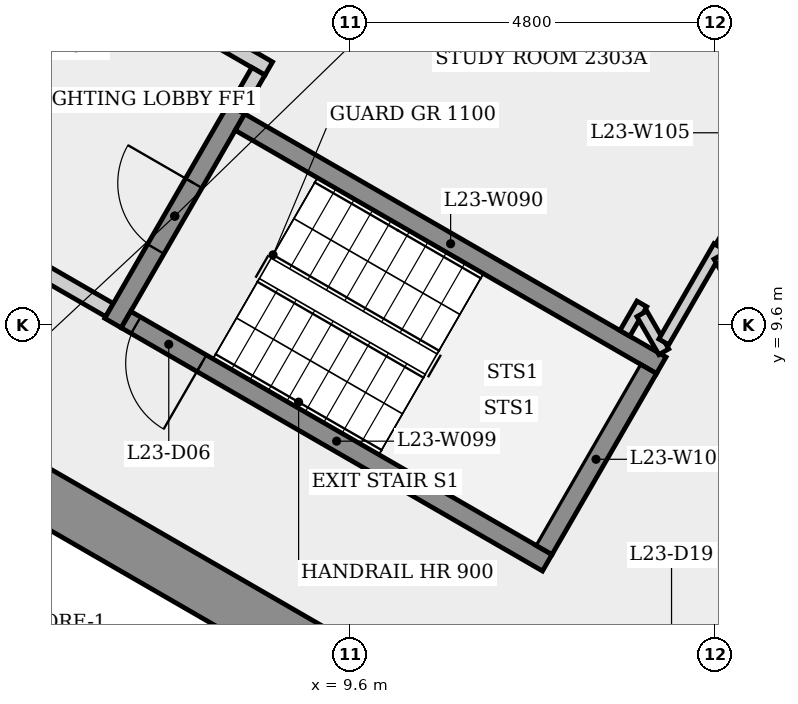
"""IFC4 building model, lengths in metres.
Left out: names, types, materials, properties, quantities, classifications, styles, units other than length and angle.
Written with IfcOpenShell. Run it as: python <this file> out.ifc"""

import sys

from ifc_helpers import new_model, si_unit, direction, frame, frame_2d, origin, origin_2d, place, context, subcontext, project, spatial, rectangle, extrude, element, fill, save


model = new_model("IFC4")
c1 = context("Model", 3, precision=1e-05, world=origin(), true_north=direction((0.0, 1.0)))
c2 = subcontext(c1, "Body", "Model", "MODEL_VIEW")
j1 = project(units=[si_unit("LENGTHUNIT", "METRE"), si_unit("PLANEANGLEUNIT", "RADIAN")], contexts=[c1])
p1 = place(None, origin())
s1 = spatial("IfcSite", under=j1, at=p1, CompositionType="ELEMENT")
p2 = place(p1, origin())
s2 = spatial("IfcBuilding", under=s1, at=p2, CompositionType="ELEMENT")
p3 = place(p2, frame((0.0, 0.0, 89.9)))
s3 = spatial("IfcBuildingStorey", under=s2, at=p3, CompositionType="ELEMENT", Elevation=89.9)
p4 = place(p3, frame((9.325, 5.182, 0.0), z_axis=(0.0, 0.0, 1.0), x_axis=(-0.866023993627, 0.500002442456, 0.0)))
e1 = element("IfcWall", 1, at=p4, inside=s3, PredefinedType="SHEAR", context=c2, shape_type="SweptSolid", body=[
    extrude(rectangle(XDim=10.97, YDim=0.7, at=frame_2d((5.485, 0.0))), origin(), (0.0, 0.0, 1.0), 3.4),
])
p5 = place(p4, frame((5.451, 0.0, 0.0)))
e2 = element("IfcOpeningElement", 2, at=p5, cuts=e1, PredefinedType="OPENING", context=c2, shape_type="SweptSolid", body=[
    extrude(rectangle(XDim=0.9, YDim=2.1, at=frame_2d((0.45, 1.05))), frame((0.0, 0.36, 0.0), z_axis=(0.0, -1.0, 0.0), x_axis=(1.0, 0.0, 0.0)), (0.0, 0.0, 1.0), 0.72),
])
p6 = place(p3, frame((14.659, 13.865, 0.0), z_axis=(0.0, 0.0, 1.0), x_axis=(0.5, 0.866025403784, 0.0)))
e3 = element("IfcColumn", 3, at=p6, inside=s3, PredefinedType="COLUMN", context=c2, shape_type="SweptSolid", body=[
    extrude(rectangle(XDim=1.05, YDim=1.05, at=origin_2d()), origin(), (0.0, 0.0, 1.0), 3.4),
])
p7 = place(p3, frame((4.459, 15.323, 0.0), z_axis=(0.0, 0.0, 1.0), x_axis=(0.866016039709, -0.500016218704, 0.0)))
e4 = element("IfcWall", 4, at=p7, inside=s3, PredefinedType="PARTITIONING", context=c2, shape_type="SweptSolid", body=[
    extrude(rectangle(XDim=4.7, YDim=0.2, at=frame_2d((2.35, 0.0))), origin(), (0.0, 0.0, 1.0), 3.05),
])
p8 = place(p3, frame((6.435, 9.795, 0.0), z_axis=(0.0, 0.0, 1.0), x_axis=(-0.866012907634, 0.500021643343, 0.0)))
e5 = element("IfcWall", 5, at=p8, inside=s3, PredefinedType="PARTITIONING", context=c2, shape_type="SweptSolid", body=[
    extrude(rectangle(XDim=4.45, YDim=0.2, at=frame_2d((2.225, 0.0))), origin(), (0.0, 0.0, 1.0), 3.05),
])
p9 = place(p8, frame((1.675, 0.0, 0.0)))
e6 = element("IfcOpeningElement", 6, at=p9, cuts=e5, PredefinedType="OPENING", context=c2, shape_type="SweptSolid", body=[
    extrude(rectangle(XDim=1.1, YDim=2.1, at=frame_2d((0.55, 1.05))), frame((0.0, 0.11, 0.0), z_axis=(0.0, -1.0, 0.0), x_axis=(1.0, 0.0, 0.0)), (0.0, 0.0, 1.0), 0.22),
])
p10 = place(p3, frame((6.48, 9.624, 0.0), z_axis=(0.0, 0.0, 1.0), x_axis=(0.500017246033, 0.866015446554, 0.0)))
e7 = element("IfcWall", 7, at=p10, inside=s3, PredefinedType="SHEAR", context=c2, shape_type="SweptSolid", body=[
    extrude(rectangle(XDim=3.25, YDim=0.25, at=frame_2d((1.625, 0.0))), origin(), (0.0, 0.0, 1.0), 3.05),
])
p11 = place(p10, frame((1.125, 0.0, 0.0)))
e8 = element("IfcOpeningElement", 8, at=p11, cuts=e7, PredefinedType="OPENING", context=c2, shape_type="SweptSolid", body=[
    extrude(rectangle(XDim=1.0, YDim=2.1, at=frame_2d((0.5, 1.05))), frame((0.0, 0.135, 0.0), z_axis=(0.0, -1.0, 0.0), x_axis=(1.0, 0.0, 0.0)), (0.0, 0.0, 1.0), 0.27),
])
p12 = place(p3, frame((8.151, 12.268, 0.0), z_axis=(0.0, 0.0, 1.0), x_axis=(0.866025499775, -0.499999833739, 0.0)))
e9 = element("IfcWall", 9, at=p12, inside=s3, PredefinedType="SHEAR", context=c2, shape_type="SweptSolid", body=[
    extrude(rectangle(XDim=6.4, YDim=0.25, at=frame_2d((3.2, 0.0))), origin(), (0.0, 0.0, 1.0), 3.05),
])
p13 = place(p3, frame((8.393, 12.937, 0.0), z_axis=(0.0, 0.0, 1.0), x_axis=(-0.500065409566, -0.86598763626, 0.0)))
e10 = element("IfcWall", 10, at=p13, inside=s3, PredefinedType="PARTITIONING", context=c2, shape_type="SweptSolid", body=[
    extrude(rectangle(XDim=0.575, YDim=0.2, at=frame_2d((0.288, 0.0))), origin(), (0.0, 0.0, 1.0), 3.05),
])
p14 = place(p3, frame((12.194, 6.47, 0.0), z_axis=(0.0, 0.0, 1.0), x_axis=(-0.866025499775, 0.499999833739, 0.0)))
e11 = element("IfcWall", 11, at=p14, inside=s3, PredefinedType="SHEAR", context=c2, shape_type="SweptSolid", body=[
    extrude(rectangle(XDim=6.4, YDim=0.25, at=frame_2d((3.2, 0.0))), origin(), (0.0, 0.0, 1.0), 3.05),
])
p15 = place(p14, frame((5.25, 0.0, 0.0)))
e12 = element("IfcOpeningElement", 12, at=p15, cuts=e11, PredefinedType="OPENING", context=c2, shape_type="SweptSolid", body=[
    extrude(rectangle(XDim=1.0, YDim=2.1, at=frame_2d((0.5, 1.05))), frame((0.0, 0.135, 0.0), z_axis=(0.0, -1.0, 0.0), x_axis=(1.0, 0.0, 0.0)), (0.0, 0.0, 1.0), 0.27),
])
p16 = place(p3, frame((13.215, 9.489, 0.0), z_axis=(0.0, 0.0, 1.0), x_axis=(0.500132045864, 0.865949153646, 0.0)))
e13 = element("IfcWall", 13, at=p16, inside=s3, PredefinedType="PARTITIONING", context=c2, shape_type="SweptSolid", body=[
    extrude(rectangle(XDim=0.447, YDim=0.15, at=frame_2d((0.224, 0.0))), origin(), (0.0, 0.0, 1.0), 3.05),
])
p17 = place(p3, frame((13.438, 9.746, 0.0), z_axis=(0.0, 0.0, 1.0), x_axis=(0.499868889286, -0.866101087359, 0.0)))
e14 = element("IfcWall", 14, at=p17, inside=s3, PredefinedType="PARTITIONING", context=c2, shape_type="SweptSolid", body=[
    extrude(rectangle(XDim=0.577, YDim=0.15, at=frame_2d((0.289, 0.0))), origin(), (0.0, 0.0, 1.0), 3.05),
])
p18 = place(p3, frame((13.523, 9.022, 0.0), z_axis=(0.0, 0.0, 1.0), x_axis=(-0.500034990121, -0.866005201286, 0.0)))
e15 = element("IfcWall", 15, at=p18, inside=s3, PredefinedType="SHEAR", context=c2, shape_type="SweptSolid", body=[
    extrude(rectangle(XDim=2.75, YDim=0.25, at=frame_2d((1.375, 0.0))), origin(), (0.0, 0.0, 1.0), 3.05),
])
p19 = place(p3, frame((13.727, 9.376, 0.0), z_axis=(0.0, 0.0, 1.0), x_axis=(0.499994385119, 0.866028645513, 0.0)))
e16 = element("IfcWall", 16, at=p19, inside=s3, PredefinedType="PARTITIONING", context=c2, shape_type="SweptSolid", body=[
    extrude(rectangle(XDim=1.451, YDim=0.15, at=frame_2d((0.725, 0.0))), origin(), (0.0, 0.0, 1.0), 3.05),
])
p20 = place(p3, frame((14.452, 10.632, 0.0), z_axis=(0.0, 0.0, 1.0), x_axis=(0.499993736042, 0.866029020252, 0.0)))
e17 = element("IfcWall", 17, at=p20, inside=s3, PredefinedType="PARTITIONING", context=c2, shape_type="SweptSolid", body=[
    extrude(rectangle(XDim=3.454, YDim=0.1, at=frame_2d((1.727, 0.0))), origin(), (0.0, 0.0, 1.0), 3.05),
])
p21 = place(p20, frame((1.016, 0.0, 0.0)))
e18 = element("IfcOpeningElement", 18, at=p21, cuts=e17, PredefinedType="OPENING", context=c2, shape_type="SweptSolid", body=[
    extrude(rectangle(XDim=0.9, YDim=2.1, at=frame_2d((0.45, 1.05))), frame((0.0, 0.06, 0.0), z_axis=(0.0, -1.0, 0.0), x_axis=(1.0, 0.0, 0.0)), (0.0, 0.0, 1.0), 0.12),
])
p22 = place(p3, frame((14.452, 10.502, 0.0), z_axis=(0.0, 0.0, 1.0), x_axis=(0.500025088952, -0.866010918186, 0.0)))
e19 = element("IfcWall", 19, at=p22, inside=s3, PredefinedType="PARTITIONING", context=c2, shape_type="SweptSolid", body=[
    extrude(rectangle(XDim=5.703, YDim=0.15, at=frame_2d((2.852, 0.0))), origin(), (0.0, 0.0, 1.0), 3.05),
])
p23 = place(p22, frame((2.297, 0.0, 0.0)))
e20 = element("IfcOpeningElement", 20, at=p23, cuts=e19, PredefinedType="OPENING", context=c2, shape_type="SweptSolid", body=[
    extrude(rectangle(XDim=1.0, YDim=2.1, at=frame_2d((0.5, 1.05))), frame((0.0, 0.085, 0.0), z_axis=(0.0, -1.0, 0.0), x_axis=(1.0, 0.0, 0.0)), (0.0, 0.0, 1.0), 0.17),
])
p24 = place(p15, origin())
e21 = element("IfcDoor", 21, at=p24, inside=s3, OperationType="SINGLE_SWING_LEFT", PredefinedType="DOOR", context=c2, shape_type="SweptSolid", body=[
    extrude(rectangle(XDim=1.0, YDim=2.1, at=frame_2d((0.5, 1.05))), frame((0.0, 0.025, 0.0), z_axis=(0.0, -1.0, 0.0), x_axis=(1.0, 0.0, 0.0)), (0.0, 0.0, 1.0), 0.05),
])
fill(e12, e21)
p25 = place(p11, origin())
e22 = element("IfcDoor", 22, at=p25, inside=s3, OperationType="SINGLE_SWING_RIGHT", PredefinedType="DOOR", context=c2, shape_type="SweptSolid", body=[
    extrude(rectangle(XDim=1.0, YDim=2.1, at=frame_2d((0.5, 1.05))), frame((0.0, 0.025, 0.0), z_axis=(0.0, -1.0, 0.0), x_axis=(1.0, 0.0, 0.0)), (0.0, 0.0, 1.0), 0.05),
])
fill(e8, e22)
save(model, sys.argv[1])
